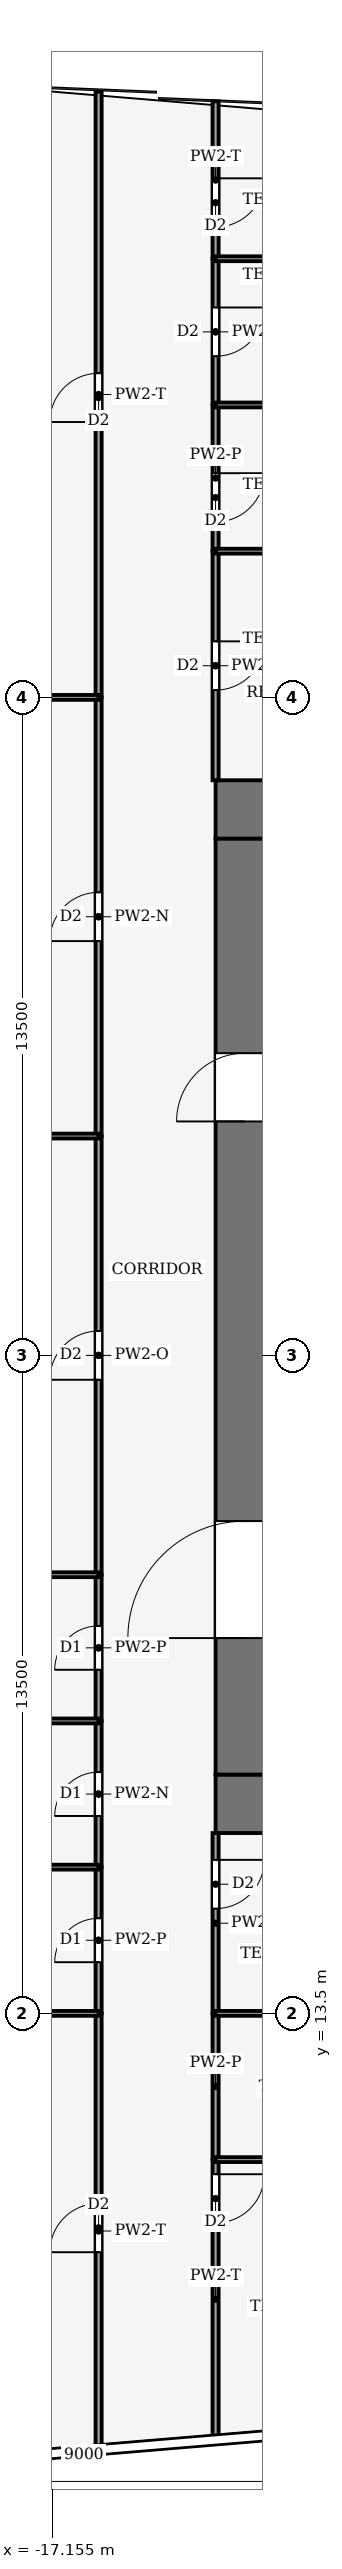
"""IFC4 building model, lengths in metres.
Left out: names, types, materials, properties, quantities, classifications, styles, units other than length and angle.
Written with IfcOpenShell. Run it as: python <this file> out.ifc"""

import sys

from ifc_helpers import new_model, si_unit, direction, frame, frame_2d, origin, place, context, subcontext, project, spatial, rectangle, extrude, element, fill, save


model = new_model("IFC4")
c1 = context("Model", 3, precision=1e-05, world=origin(), true_north=direction((0.0, 1.0)))
c2 = subcontext(c1, "Body", "Model", "MODEL_VIEW")
j1 = project(units=[si_unit("LENGTHUNIT", "METRE"), si_unit("PLANEANGLEUNIT", "RADIAN")], contexts=[c1])
p1 = place(None, origin())
s1 = spatial("IfcSite", under=j1, at=p1, CompositionType="ELEMENT")
p2 = place(p1, origin())
s2 = spatial("IfcBuilding", under=s1, at=p2, CompositionType="ELEMENT")
p3 = place(p2, frame((0.0, 0.0, 110.0)))
s3 = spatial("IfcBuildingStorey", under=s2, at=p3, CompositionType="ELEMENT", Elevation=110.0)
for number, where, z_axis, x_axis in (
    (1, (-13.8, 17.8, -0.13), (0.0, 0.0, 1.0), (1.0, 0.0, 0.0)),
    (2, (-13.8, 38.2, -0.13), (0.0, 0.0, 1.0), (1.0, 0.0, 0.0)),
):
    element("IfcWall", number, at=place(p3, frame(where, z_axis=z_axis, x_axis=x_axis)), inside=s3, PredefinedType="SHEAR", context=c2, shape_type="SweptSolid", body=[
        extrude(rectangle(XDim=27.6, YDim=1.2, at=frame_2d((13.8, 0.0))), origin(), (0.0, 0.0, 1.0), 3.88),
    ])
p4 = place(p3, frame((-13.2, 18.4, -0.13), z_axis=(0.0, 0.0, 1.0), x_axis=(0.0, 1.0, 0.0)))
e3 = element("IfcWall", 3, at=p4, inside=s3, PredefinedType="SHEAR", context=c2, shape_type="SweptSolid", body=[
    extrude(rectangle(XDim=19.2, YDim=1.2, at=frame_2d((9.6, 0.0))), origin(), (0.0, 0.0, 1.0), 3.88),
])
p5 = place(p4, frame((2.8, 0.0, 0.13)))
e4 = element("IfcOpeningElement", 4, at=p5, cuts=e3, PredefinedType="OPENING", context=c2, shape_type="SweptSolid", body=[
    extrude(rectangle(XDim=2.4, YDim=2.4, at=frame_2d((1.2, 1.2))), frame((0.0, 0.61, 0.0), z_axis=(0.0, -1.0, 0.0), x_axis=(1.0, 0.0, 0.0)), (0.0, 0.0, 1.0), 1.22),
])
p6 = place(p4, frame((13.4, 0.0, 0.13)))
e5 = element("IfcOpeningElement", 5, at=p6, cuts=e3, PredefinedType="OPENING", context=c2, shape_type="SweptSolid", body=[
    extrude(rectangle(XDim=1.4, YDim=2.2, at=frame_2d((0.7, 1.1))), frame((0.0, 0.61, 0.0), z_axis=(0.0, -1.0, 0.0), x_axis=(1.0, 0.0, 0.0)), (0.0, 0.0, 1.0), 1.22),
])
p7 = place(p3, frame((-16.2, 4.57, 0.0), z_axis=(0.0, 0.0, 1.0), x_axis=(0.0, 1.0, 0.0)))
e6 = element("IfcWall", 6, at=p7, inside=s3, PredefinedType="PARTITIONING", context=c2, shape_type="SweptSolid", body=[
    extrude(rectangle(XDim=8.93, YDim=0.125, at=frame_2d((4.465, 0.0))), origin(), (0.0, 0.0, 1.0), 2.92),
])
p8 = place(p7, frame((4.03, 0.0, 0.0)))
e7 = element("IfcOpeningElement", 7, at=p8, cuts=e6, PredefinedType="OPENING", context=c2, shape_type="SweptSolid", body=[
    extrude(rectangle(XDim=1.0, YDim=2.1, at=frame_2d((0.5, 1.05))), frame((0.0, 0.073, 0.0), z_axis=(0.0, -1.0, 0.0), x_axis=(1.0, 0.0, 0.0)), (0.0, 0.0, 1.0), 0.145),
])
p9 = place(p3, frame((-16.2, 13.5, 0.0), z_axis=(0.0, 0.0, 1.0), x_axis=(0.0, 1.0, 0.0)))
e8 = element("IfcWall", 8, at=p9, inside=s3, PredefinedType="PARTITIONING", context=c2, shape_type="SweptSolid", body=[
    extrude(rectangle(XDim=3.0, YDim=0.125, at=frame_2d((1.5, 0.0))), origin(), (0.0, 0.0, 1.0), 3.75),
])
p10 = place(p9, frame((1.05, 0.0, 0.0)))
e9 = element("IfcOpeningElement", 9, at=p10, cuts=e8, PredefinedType="OPENING", context=c2, shape_type="SweptSolid", body=[
    extrude(rectangle(XDim=0.9, YDim=2.1, at=frame_2d((0.45, 1.05))), frame((0.0, 0.073, 0.0), z_axis=(0.0, -1.0, 0.0), x_axis=(1.0, 0.0, 0.0)), (0.0, 0.0, 1.0), 0.145),
])
p11 = place(p3, frame((-16.2, 16.5, 0.0), z_axis=(0.0, 0.0, 1.0), x_axis=(0.0, 1.0, 0.0)))
e10 = element("IfcWall", 10, at=p11, inside=s3, PredefinedType="PARTITIONING", context=c2, shape_type="SweptSolid", body=[
    extrude(rectangle(XDim=3.0, YDim=0.125, at=frame_2d((1.5, 0.0))), origin(), (0.0, 0.0, 1.0), 3.02),
])
p12 = place(p11, frame((1.05, 0.0, 0.0)))
e11 = element("IfcOpeningElement", 11, at=p12, cuts=e10, PredefinedType="OPENING", context=c2, shape_type="SweptSolid", body=[
    extrude(rectangle(XDim=0.9, YDim=2.1, at=frame_2d((0.45, 1.05))), frame((0.0, 0.073, 0.0), z_axis=(0.0, -1.0, 0.0), x_axis=(1.0, 0.0, 0.0)), (0.0, 0.0, 1.0), 0.145),
])
p13 = place(p3, frame((-16.2, 19.5, 0.0), z_axis=(0.0, 0.0, 1.0), x_axis=(0.0, 1.0, 0.0)))
e12 = element("IfcWall", 12, at=p13, inside=s3, PredefinedType="PARTITIONING", context=c2, shape_type="SweptSolid", body=[
    extrude(rectangle(XDim=3.0, YDim=0.125, at=frame_2d((1.5, 0.0))), origin(), (0.0, 0.0, 1.0), 3.75),
])
p14 = place(p13, frame((1.05, 0.0, 0.0)))
e13 = element("IfcOpeningElement", 13, at=p14, cuts=e12, PredefinedType="OPENING", context=c2, shape_type="SweptSolid", body=[
    extrude(rectangle(XDim=0.9, YDim=2.1, at=frame_2d((0.45, 1.05))), frame((0.0, 0.073, 0.0), z_axis=(0.0, -1.0, 0.0), x_axis=(1.0, 0.0, 0.0)), (0.0, 0.0, 1.0), 0.145),
])
p15 = place(p3, frame((-16.2, 22.5, 0.0), z_axis=(0.0, 0.0, 1.0), x_axis=(0.0, 1.0, 0.0)))
e14 = element("IfcWall", 14, at=p15, inside=s3, PredefinedType="PARTITIONING", context=c2, shape_type="SweptSolid", body=[
    extrude(rectangle(XDim=9.0, YDim=0.125, at=frame_2d((4.5, 0.0))), origin(), (0.0, 0.0, 1.0), 3.36),
])
p16 = place(p15, frame((4.0, 0.0, 0.0)))
e15 = element("IfcOpeningElement", 15, at=p16, cuts=e14, PredefinedType="OPENING", context=c2, shape_type="SweptSolid", body=[
    extrude(rectangle(XDim=1.0, YDim=2.1, at=frame_2d((0.5, 1.05))), frame((0.0, 0.073, 0.0), z_axis=(0.0, -1.0, 0.0), x_axis=(1.0, 0.0, 0.0)), (0.0, 0.0, 1.0), 0.145),
])
p17 = place(p3, frame((-16.2, 31.5, 0.0), z_axis=(0.0, 0.0, 1.0), x_axis=(0.0, 1.0, 0.0)))
e16 = element("IfcWall", 16, at=p17, inside=s3, PredefinedType="PARTITIONING", context=c2, shape_type="SweptSolid", body=[
    extrude(rectangle(XDim=9.0, YDim=0.125, at=frame_2d((4.5, 0.0))), origin(), (0.0, 0.0, 1.0), 3.02),
])
p18 = place(p17, frame((4.0, 0.0, 0.0)))
e17 = element("IfcOpeningElement", 17, at=p18, cuts=e16, PredefinedType="OPENING", context=c2, shape_type="SweptSolid", body=[
    extrude(rectangle(XDim=1.0, YDim=2.1, at=frame_2d((0.5, 1.05))), frame((0.0, 0.073, 0.0), z_axis=(0.0, -1.0, 0.0), x_axis=(1.0, 0.0, 0.0)), (0.0, 0.0, 1.0), 0.145),
])
p19 = place(p3, frame((-16.2, 40.5, 0.0), z_axis=(0.0, 0.0, 1.0), x_axis=(0.0, 1.0, 0.0)))
e18 = element("IfcWall", 18, at=p19, inside=s3, PredefinedType="PARTITIONING", context=c2, shape_type="SweptSolid", body=[
    extrude(rectangle(XDim=12.43, YDim=0.125, at=frame_2d((6.215, 0.0))), origin(), (0.0, 0.0, 1.0), 2.92),
])
p20 = place(p19, frame((5.65, 0.0, 0.0)))
e19 = element("IfcOpeningElement", 19, at=p20, cuts=e18, PredefinedType="OPENING", context=c2, shape_type="SweptSolid", body=[
    extrude(rectangle(XDim=1.0, YDim=2.1, at=frame_2d((0.5, 1.05))), frame((0.0, 0.073, 0.0), z_axis=(0.0, -1.0, 0.0), x_axis=(1.0, 0.0, 0.0)), (0.0, 0.0, 1.0), 0.145),
])
p21 = place(p3, frame((-13.8, 10.5, 0.0), z_axis=(0.0, 0.0, 1.0), x_axis=(0.0, -1.0, 0.0)))
e20 = element("IfcWall", 20, at=p21, inside=s3, PredefinedType="PARTITIONING", context=c2, shape_type="SweptSolid", body=[
    extrude(rectangle(XDim=5.73, YDim=0.125, at=frame_2d((2.865, 0.0))), origin(), (0.0, 0.0, 1.0), 2.92),
])
p22 = place(p21, frame((0.3, 0.0, 0.0)))
e21 = element("IfcOpeningElement", 21, at=p22, cuts=e20, PredefinedType="OPENING", context=c2, shape_type="SweptSolid", body=[
    extrude(rectangle(XDim=1.0, YDim=2.1, at=frame_2d((0.5, 1.05))), frame((0.0, 0.073, 0.0), z_axis=(0.0, -1.0, 0.0), x_axis=(1.0, 0.0, 0.0)), (0.0, 0.0, 1.0), 0.145),
])
p23 = place(p3, frame((-13.8, 10.5, 0.0), z_axis=(0.0, 0.0, 1.0), x_axis=(0.0, 1.0, 0.0)))
e22 = element("IfcWall", 22, at=p23, inside=s3, PredefinedType="PARTITIONING", context=c2, shape_type="SweptSolid", body=[
    extrude(rectangle(XDim=3.0, YDim=0.125, at=frame_2d((1.5, 0.0))), origin(), (0.0, 0.0, 1.0), 3.75),
])
p24 = place(p3, frame((-13.8, 17.2, 0.0), z_axis=(0.0, 0.0, 1.0), x_axis=(0.0, -1.0, 0.0)))
e23 = element("IfcWall", 23, at=p24, inside=s3, PredefinedType="PARTITIONING", context=c2, shape_type="SweptSolid", body=[
    extrude(rectangle(XDim=3.7, YDim=0.125, at=frame_2d((1.85, 0.0))), origin(), (0.0, 0.0, 1.0), 3.02),
])
p25 = place(p24, frame((0.55, 0.0, 0.0)))
e24 = element("IfcOpeningElement", 24, at=p25, cuts=e23, PredefinedType="OPENING", context=c2, shape_type="SweptSolid", body=[
    extrude(rectangle(XDim=1.0, YDim=2.1, at=frame_2d((0.5, 1.05))), frame((0.0, 0.073, 0.0), z_axis=(0.0, -1.0, 0.0), x_axis=(1.0, 0.0, 0.0)), (0.0, 0.0, 1.0), 0.145),
])
p26 = place(p3, frame((-13.8, 43.5, 0.0), z_axis=(0.0, 0.0, 1.0), x_axis=(0.0, -1.0, 0.0)))
e25 = element("IfcWall", 25, at=p26, inside=s3, PredefinedType="PARTITIONING", context=c2, shape_type="SweptSolid", body=[
    extrude(rectangle(XDim=4.7, YDim=0.125, at=frame_2d((2.35, 0.0))), origin(), (0.0, 0.0, 1.0), 3.02),
])
p27 = place(p26, frame((1.85, 0.0, 0.0)))
e26 = element("IfcOpeningElement", 26, at=p27, cuts=e25, PredefinedType="OPENING", context=c2, shape_type="SweptSolid", body=[
    extrude(rectangle(XDim=1.0, YDim=2.1, at=frame_2d((0.5, 1.05))), frame((0.0, 0.073, 0.0), z_axis=(0.0, -1.0, 0.0), x_axis=(1.0, 0.0, 0.0)), (0.0, 0.0, 1.0), 0.145),
])
p28 = place(p3, frame((-13.8, 46.5, 0.0), z_axis=(0.0, 0.0, 1.0), x_axis=(0.0, -1.0, 0.0)))
e27 = element("IfcWall", 27, at=p28, inside=s3, PredefinedType="PARTITIONING", context=c2, shape_type="SweptSolid", body=[
    extrude(rectangle(XDim=3.0, YDim=0.125, at=frame_2d((1.5, 0.0))), origin(), (0.0, 0.0, 1.0), 3.75),
])
p29 = place(p28, frame((1.4, 0.0, 0.0)))
e28 = element("IfcOpeningElement", 28, at=p29, cuts=e27, PredefinedType="OPENING", context=c2, shape_type="SweptSolid", body=[
    extrude(rectangle(XDim=1.0, YDim=2.1, at=frame_2d((0.5, 1.05))), frame((0.0, 0.073, 0.0), z_axis=(0.0, -1.0, 0.0), x_axis=(1.0, 0.0, 0.0)), (0.0, 0.0, 1.0), 0.145),
])
p30 = place(p3, frame((-13.8, 49.5, 0.0), z_axis=(0.0, 0.0, 1.0), x_axis=(0.0, -1.0, 0.0)))
e29 = element("IfcWall", 29, at=p30, inside=s3, PredefinedType="PARTITIONING", context=c2, shape_type="SweptSolid", body=[
    extrude(rectangle(XDim=3.0, YDim=0.125, at=frame_2d((1.5, 0.0))), origin(), (0.0, 0.0, 1.0), 3.75),
])
p31 = place(p30, frame((1.0, 0.0, 0.0)))
e30 = element("IfcOpeningElement", 30, at=p31, cuts=e29, PredefinedType="OPENING", context=c2, shape_type="SweptSolid", body=[
    extrude(rectangle(XDim=1.0, YDim=2.1, at=frame_2d((0.5, 1.05))), frame((0.0, 0.073, 0.0), z_axis=(0.0, -1.0, 0.0), x_axis=(1.0, 0.0, 0.0)), (0.0, 0.0, 1.0), 0.145),
])
p32 = place(p3, frame((-13.8, 52.73, 0.0), z_axis=(0.0, 0.0, 1.0), x_axis=(0.0, -1.0, 0.0)))
e31 = element("IfcWall", 31, at=p32, inside=s3, PredefinedType="PARTITIONING", context=c2, shape_type="SweptSolid", body=[
    extrude(rectangle(XDim=3.23, YDim=0.125, at=frame_2d((1.615, 0.0))), origin(), (0.0, 0.0, 1.0), 2.92),
])
p33 = place(p32, frame((1.58, 0.0, 0.0)))
e32 = element("IfcOpeningElement", 32, at=p33, cuts=e31, PredefinedType="OPENING", context=c2, shape_type="SweptSolid", body=[
    extrude(rectangle(XDim=1.0, YDim=2.1, at=frame_2d((0.5, 1.05))), frame((0.0, 0.073, 0.0), z_axis=(0.0, -1.0, 0.0), x_axis=(1.0, 0.0, 0.0)), (0.0, 0.0, 1.0), 0.145),
])
p34 = place(p3, frame((-16.2, 13.5, 0.0), z_axis=(0.0, 0.0, 1.0), x_axis=(-1.0, 0.0, 0.0)))
e33 = element("IfcWall", 33, at=p34, inside=s3, PredefinedType="PARTITIONING", context=c2, shape_type="SweptSolid", body=[
    extrude(rectangle(XDim=7.634, YDim=0.1, at=frame_2d((3.817, 0.0))), origin(), (0.0, 0.0, 1.0), 2.92),
])
p35 = place(p3, frame((-16.2, 16.5, 0.0), z_axis=(0.0, 0.0, 1.0), x_axis=(-1.0, 0.0, 0.0)))
e34 = element("IfcWall", 34, at=p35, inside=s3, PredefinedType="PARTITIONING", context=c2, shape_type="SweptSolid", body=[
    extrude(rectangle(XDim=7.387, YDim=0.1, at=frame_2d((3.693, 0.0))), origin(), (0.0, 0.0, 1.0), 2.92),
])
p36 = place(p3, frame((-16.2, 19.5, 0.0), z_axis=(0.0, 0.0, 1.0), x_axis=(-1.0, 0.0, 0.0)))
e35 = element("IfcWall", 35, at=p36, inside=s3, PredefinedType="PARTITIONING", context=c2, shape_type="SweptSolid", body=[
    extrude(rectangle(XDim=7.14, YDim=0.1, at=frame_2d((3.57, 0.0))), origin(), (0.0, 0.0, 1.0), 2.92),
])
p37 = place(p3, frame((-16.2, 22.5, 0.0), z_axis=(0.0, 0.0, 1.0), x_axis=(-1.0, 0.0, 0.0)))
e36 = element("IfcWall", 36, at=p37, inside=s3, PredefinedType="PARTITIONING", context=c2, shape_type="SweptSolid", body=[
    extrude(rectangle(XDim=6.894, YDim=0.1, at=frame_2d((3.447, 0.0))), origin(), (0.0, 0.0, 1.0), 2.92),
])
p38 = place(p3, frame((-16.2, 31.5, 0.0), z_axis=(0.0, 0.0, 1.0), x_axis=(-1.0, 0.0, 0.0)))
e37 = element("IfcWall", 37, at=p38, inside=s3, PredefinedType="PARTITIONING", context=c2, shape_type="SweptSolid", body=[
    extrude(rectangle(XDim=6.606, YDim=0.1, at=frame_2d((3.303, 0.0))), origin(), (0.0, 0.0, 1.0), 2.92),
])
p39 = place(p3, frame((-16.2, 40.5, 0.0), z_axis=(0.0, 0.0, 1.0), x_axis=(-1.0, 0.0, 0.0)))
e38 = element("IfcWall", 38, at=p39, inside=s3, PredefinedType="PARTITIONING", context=c2, shape_type="SweptSolid", body=[
    extrude(rectangle(XDim=7.346, YDim=0.1, at=frame_2d((3.673, 0.0))), origin(), (0.0, 0.0, 1.0), 2.92),
])
p40 = place(p3, frame((-13.8, 10.5, 0.0), z_axis=(0.0, 0.0, 1.0), x_axis=(1.0, 0.0, 0.0)))
e39 = element("IfcWall", 39, at=p40, inside=s3, PredefinedType="PARTITIONING", context=c2, shape_type="SweptSolid", body=[
    extrude(rectangle(XDim=6.3, YDim=0.1, at=frame_2d((3.15, 0.0))), origin(), (0.0, 0.0, 1.0), 3.27),
])
p41 = place(p40, frame((2.65, 0.0, 0.0)))
e40 = element("IfcOpeningElement", 40, at=p41, cuts=e39, PredefinedType="OPENING", context=c2, shape_type="SweptSolid", body=[
    extrude(rectangle(XDim=1.0, YDim=2.1, at=frame_2d((0.5, 1.05))), frame((0.0, 0.06, 0.0), z_axis=(0.0, -1.0, 0.0), x_axis=(1.0, 0.0, 0.0)), (0.0, 0.0, 1.0), 0.12),
])
p42 = place(p3, frame((-7.5, 13.5, 0.0), z_axis=(0.0, 0.0, 1.0), x_axis=(-1.0, 0.0, 0.0)))
e41 = element("IfcWall", 41, at=p42, inside=s3, PredefinedType="PARTITIONING", context=c2, shape_type="SweptSolid", body=[
    extrude(rectangle(XDim=6.3, YDim=0.1, at=frame_2d((3.15, 0.0))), origin(), (0.0, 0.0, 1.0), 3.27),
])
for number, where, z_axis, x_axis in (
    (42, (-10.5, 43.5, 0.0), (0.0, 0.0, 1.0), (-1.0, 0.0, 0.0)),
    (43, (-10.5, 46.5, 0.0), (0.0, 0.0, 1.0), (-1.0, 0.0, 0.0)),
    (44, (-10.5, 49.5, 0.0), (0.0, 0.0, 1.0), (-1.0, 0.0, 0.0)),
):
    element("IfcWall", number, at=place(p3, frame(where, z_axis=z_axis, x_axis=x_axis)), inside=s3, PredefinedType="PARTITIONING", context=c2, shape_type="SweptSolid", body=[
        extrude(rectangle(XDim=3.3, YDim=0.1, at=frame_2d((1.65, 0.0))), origin(), (0.0, 0.0, 1.0), 3.27),
    ])
p43 = place(p5, origin())
e45 = element("IfcDoor", 45, at=p43, inside=s3, OperationType="DOUBLE_DOOR_SINGLE_SWING", PredefinedType="DOOR", context=c2, shape_type="SweptSolid", body=[
    extrude(rectangle(XDim=2.4, YDim=2.4, at=frame_2d((1.2, 1.2))), frame((0.0, 0.025, 0.0), z_axis=(0.0, -1.0, 0.0), x_axis=(1.0, 0.0, 0.0)), (0.0, 0.0, 1.0), 0.05),
])
fill(e4, e45)
p44 = place(p6, origin())
e46 = element("IfcDoor", 46, at=p44, inside=s3, OperationType="SINGLE_SWING_RIGHT", PredefinedType="DOOR", context=c2, shape_type="SweptSolid", body=[
    extrude(rectangle(XDim=1.4, YDim=2.2, at=frame_2d((0.7, 1.1))), frame((0.0, 0.025, 0.0), z_axis=(0.0, -1.0, 0.0), x_axis=(1.0, 0.0, 0.0)), (0.0, 0.0, 1.0), 0.05),
])
fill(e5, e46)
p45 = place(p8, origin())
e47 = element("IfcDoor", 47, at=p45, inside=s3, OperationType="SINGLE_SWING_RIGHT", PredefinedType="DOOR", context=c2, shape_type="SweptSolid", body=[
    extrude(rectangle(XDim=1.0, YDim=2.1, at=frame_2d((0.5, 1.05))), frame((0.0, 0.025, 0.0), z_axis=(0.0, -1.0, 0.0), x_axis=(1.0, 0.0, 0.0)), (0.0, 0.0, 1.0), 0.05),
])
fill(e7, e47)
p46 = place(p10, origin())
e48 = element("IfcDoor", 48, at=p46, inside=s3, OperationType="SINGLE_SWING_RIGHT", PredefinedType="DOOR", context=c2, shape_type="SweptSolid", body=[
    extrude(rectangle(XDim=0.9, YDim=2.1, at=frame_2d((0.45, 1.05))), frame((0.0, 0.025, 0.0), z_axis=(0.0, -1.0, 0.0), x_axis=(1.0, 0.0, 0.0)), (0.0, 0.0, 1.0), 0.05),
])
fill(e9, e48)
p47 = place(p12, origin())
e49 = element("IfcDoor", 49, at=p47, inside=s3, OperationType="SINGLE_SWING_LEFT", PredefinedType="DOOR", context=c2, shape_type="SweptSolid", body=[
    extrude(rectangle(XDim=0.9, YDim=2.1, at=frame_2d((0.45, 1.05))), frame((0.0, 0.025, 0.0), z_axis=(0.0, -1.0, 0.0), x_axis=(1.0, 0.0, 0.0)), (0.0, 0.0, 1.0), 0.05),
])
fill(e11, e49)
p48 = place(p14, origin())
e50 = element("IfcDoor", 50, at=p48, inside=s3, OperationType="SINGLE_SWING_RIGHT", PredefinedType="DOOR", context=c2, shape_type="SweptSolid", body=[
    extrude(rectangle(XDim=0.9, YDim=2.1, at=frame_2d((0.45, 1.05))), frame((0.0, 0.025, 0.0), z_axis=(0.0, -1.0, 0.0), x_axis=(1.0, 0.0, 0.0)), (0.0, 0.0, 1.0), 0.05),
])
fill(e13, e50)
p49 = place(p16, origin())
e51 = element("IfcDoor", 51, at=p49, inside=s3, OperationType="SINGLE_SWING_LEFT", PredefinedType="DOOR", context=c2, shape_type="SweptSolid", body=[
    extrude(rectangle(XDim=1.0, YDim=2.1, at=frame_2d((0.5, 1.05))), frame((0.0, 0.025, 0.0), z_axis=(0.0, -1.0, 0.0), x_axis=(1.0, 0.0, 0.0)), (0.0, 0.0, 1.0), 0.05),
])
fill(e15, e51)
p50 = place(p18, origin())
e52 = element("IfcDoor", 52, at=p50, inside=s3, OperationType="SINGLE_SWING_RIGHT", PredefinedType="DOOR", context=c2, shape_type="SweptSolid", body=[
    extrude(rectangle(XDim=1.0, YDim=2.1, at=frame_2d((0.5, 1.05))), frame((0.0, 0.025, 0.0), z_axis=(0.0, -1.0, 0.0), x_axis=(1.0, 0.0, 0.0)), (0.0, 0.0, 1.0), 0.05),
])
fill(e17, e52)
p51 = place(p20, origin())
e53 = element("IfcDoor", 53, at=p51, inside=s3, OperationType="SINGLE_SWING_LEFT", PredefinedType="DOOR", context=c2, shape_type="SweptSolid", body=[
    extrude(rectangle(XDim=1.0, YDim=2.1, at=frame_2d((0.5, 1.05))), frame((0.0, 0.025, 0.0), z_axis=(0.0, -1.0, 0.0), x_axis=(1.0, 0.0, 0.0)), (0.0, 0.0, 1.0), 0.05),
])
fill(e19, e53)
p52 = place(p22, origin())
e54 = element("IfcDoor", 54, at=p52, inside=s3, OperationType="SINGLE_SWING_LEFT", PredefinedType="DOOR", context=c2, shape_type="SweptSolid", body=[
    extrude(rectangle(XDim=1.0, YDim=2.1, at=frame_2d((0.5, 1.05))), frame((0.0, 0.025, 0.0), z_axis=(0.0, -1.0, 0.0), x_axis=(1.0, 0.0, 0.0)), (0.0, 0.0, 1.0), 0.05),
])
fill(e21, e54)
p53 = place(p25, origin())
e55 = element("IfcDoor", 55, at=p53, inside=s3, OperationType="SINGLE_SWING_LEFT", PredefinedType="DOOR", context=c2, shape_type="SweptSolid", body=[
    extrude(rectangle(XDim=1.0, YDim=2.1, at=frame_2d((0.5, 1.05))), frame((0.0, 0.025, 0.0), z_axis=(0.0, -1.0, 0.0), x_axis=(1.0, 0.0, 0.0)), (0.0, 0.0, 1.0), 0.05),
])
fill(e24, e55)
p54 = place(p27, origin())
e56 = element("IfcDoor", 56, at=p54, inside=s3, OperationType="SINGLE_SWING_RIGHT", PredefinedType="DOOR", context=c2, shape_type="SweptSolid", body=[
    extrude(rectangle(XDim=1.0, YDim=2.1, at=frame_2d((0.5, 1.05))), frame((0.0, 0.025, 0.0), z_axis=(0.0, -1.0, 0.0), x_axis=(1.0, 0.0, 0.0)), (0.0, 0.0, 1.0), 0.05),
])
fill(e26, e56)
p55 = place(p29, origin())
e57 = element("IfcDoor", 57, at=p55, inside=s3, OperationType="SINGLE_SWING_RIGHT", PredefinedType="DOOR", context=c2, shape_type="SweptSolid", body=[
    extrude(rectangle(XDim=1.0, YDim=2.1, at=frame_2d((0.5, 1.05))), frame((0.0, 0.025, 0.0), z_axis=(0.0, -1.0, 0.0), x_axis=(1.0, 0.0, 0.0)), (0.0, 0.0, 1.0), 0.05),
])
fill(e28, e57)
p56 = place(p31, origin())
e58 = element("IfcDoor", 58, at=p56, inside=s3, OperationType="SINGLE_SWING_RIGHT", PredefinedType="DOOR", context=c2, shape_type="SweptSolid", body=[
    extrude(rectangle(XDim=1.0, YDim=2.1, at=frame_2d((0.5, 1.05))), frame((0.0, 0.025, 0.0), z_axis=(0.0, -1.0, 0.0), x_axis=(1.0, 0.0, 0.0)), (0.0, 0.0, 1.0), 0.05),
])
fill(e30, e58)
p57 = place(p33, origin())
e59 = element("IfcDoor", 59, at=p57, inside=s3, OperationType="SINGLE_SWING_RIGHT", PredefinedType="DOOR", context=c2, shape_type="SweptSolid", body=[
    extrude(rectangle(XDim=1.0, YDim=2.1, at=frame_2d((0.5, 1.05))), frame((0.0, 0.025, 0.0), z_axis=(0.0, -1.0, 0.0), x_axis=(1.0, 0.0, 0.0)), (0.0, 0.0, 1.0), 0.05),
])
fill(e32, e59)
save(model, sys.argv[1])
